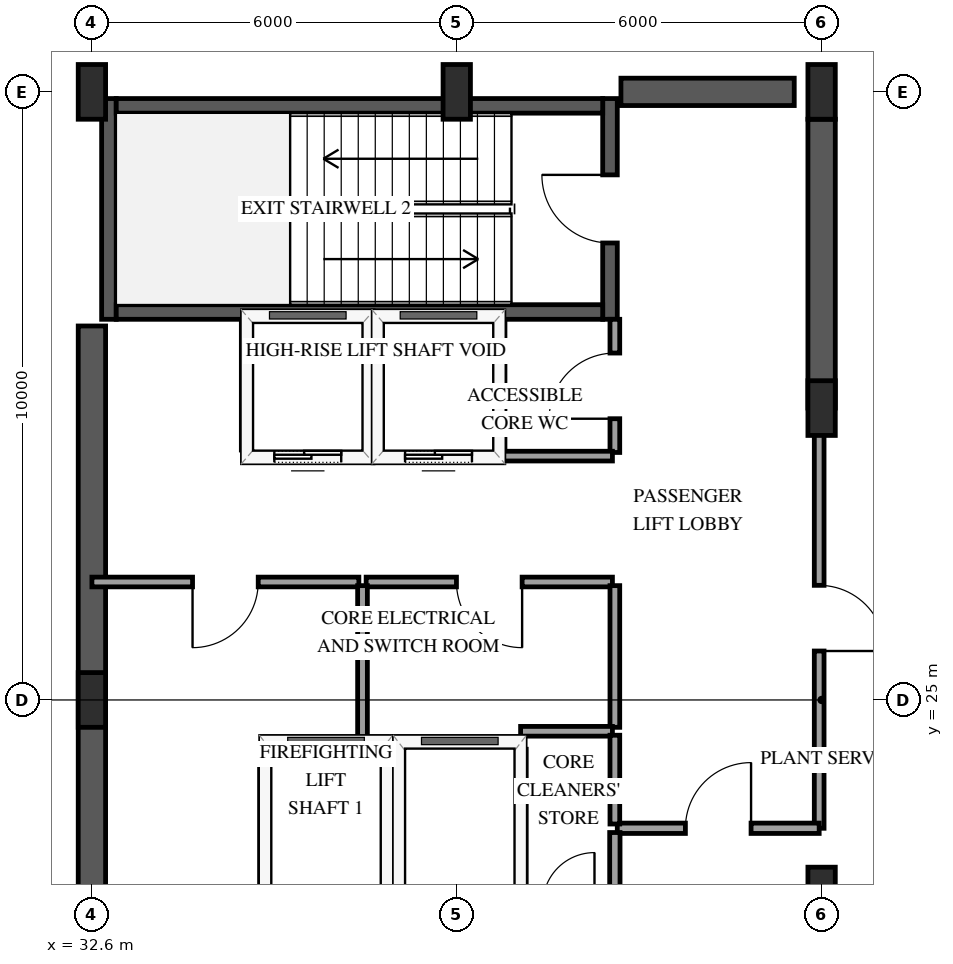
"""IFC4 building model, lengths in metres.
Left out: names, types, materials, properties, quantities, classifications, styles, units other than length and angle.
Written with IfcOpenShell. Run it as: python <this file> out.ifc"""

import sys

from ifc_helpers import new_model, si_unit, direction, frame, frame_2d, origin, origin_2d, place, context, subcontext, project, spatial, rectangle, extrude, element, fill, save


model = new_model("IFC4")
c1 = context("Model", 3, precision=1e-05, world=origin(), true_north=direction((0.0, 1.0)))
c2 = subcontext(c1, "Body", "Model", "MODEL_VIEW")
j1 = project(units=[si_unit("LENGTHUNIT", "METRE"), si_unit("PLANEANGLEUNIT", "RADIAN")], contexts=[c1])
p1 = place(None, origin())
s1 = spatial("IfcSite", under=j1, at=p1, CompositionType="ELEMENT")
p2 = place(p1, origin())
s2 = spatial("IfcBuilding", under=s1, at=p2, CompositionType="ELEMENT")
p3 = place(p2, frame((0.0, 0.0, 283.75)))
s3 = spatial("IfcBuildingStorey", under=s2, at=p3, CompositionType="ELEMENT", Elevation=283.75)
p4 = place(p3, frame((32.88, 31.26, 0.0), z_axis=(0.0, 0.0, 1.0), x_axis=(0.0, 1.0, 0.0)))
e1 = element("IfcWall", 1, at=p4, inside=s3, PredefinedType="SHEAR", context=c2, shape_type="SweptSolid", body=[
    extrude(rectangle(XDim=3.63, YDim=0.24, at=frame_2d((1.815, 0.0))), origin(), (0.0, 0.0, 1.0), 4.8),
])
p5 = place(p3, frame((41.12, 31.26, 0.0), z_axis=(0.0, 0.0, 1.0), x_axis=(0.0, 1.0, 0.0)))
e2 = element("IfcWall", 2, at=p5, inside=s3, PredefinedType="SHEAR", context=c2, shape_type="SweptSolid", body=[
    extrude(rectangle(XDim=3.63, YDim=0.24, at=frame_2d((1.815, 0.0))), origin(), (0.0, 0.0, 1.0), 4.8),
])
p6 = place(p5, frame((1.255, 0.0, 0.0)))
e3 = element("IfcOpeningElement", 3, at=p6, cuts=e2, PredefinedType="OPENING", context=c2, shape_type="SweptSolid", body=[
    extrude(rectangle(XDim=1.12, YDim=2.15, at=frame_2d((0.56, 1.075))), frame((0.0, 0.13, 0.0), z_axis=(0.0, -1.0, 0.0), x_axis=(1.0, 0.0, 0.0)), (0.0, 0.0, 1.0), 0.26),
])
for number, where, z_axis, x_axis in (
    (4, (33.0, 31.38, 0.0), (0.0, 0.0, 1.0), (1.0, 0.0, 0.0)),
    (5, (33.0, 34.77, 0.0), (0.0, 0.0, 1.0), (1.0, 0.0, 0.0)),
):
    element("IfcWall", number, at=place(p3, frame(where, z_axis=z_axis, x_axis=x_axis)), inside=s3, PredefinedType="SHEAR", context=c2, shape_type="SweptSolid", body=[
        extrude(rectangle(XDim=8.0, YDim=0.24, at=frame_2d((4.0, 0.0))), origin(), (0.0, 0.0, 1.0), 4.8),
    ])
p7 = place(p3, frame((32.6, 18.85, 0.0), z_axis=(0.0, 0.0, 1.0), x_axis=(0.0, 1.0, 0.0)))
e6 = element("IfcWall", 6, at=p7, inside=s3, PredefinedType="SHEAR", context=c2, shape_type="SweptSolid", body=[
    extrude(rectangle(XDim=12.3, YDim=0.45, at=frame_2d((6.15, 0.0))), origin(), (0.0, 0.0, 1.0), 4.8),
])
p8 = place(p3, frame((41.3, 35.0, 0.0), z_axis=(0.0, 0.0, 1.0), x_axis=(1.0, 0.0, 0.0)))
e7 = element("IfcWall", 7, at=p8, inside=s3, PredefinedType="SHEAR", context=c2, shape_type="SweptSolid", body=[
    extrude(rectangle(XDim=2.85, YDim=0.45, at=frame_2d((1.425, 0.0))), origin(), (0.0, 0.0, 1.0), 4.8),
])
p9 = place(p3, frame((44.6, 29.8, 0.0), z_axis=(0.0, 0.0, 1.0), x_axis=(0.0, 1.0, 0.0)))
e8 = element("IfcWall", 8, at=p9, inside=s3, PredefinedType="SHEAR", context=c2, shape_type="SweptSolid", body=[
    extrude(rectangle(XDim=4.75, YDim=0.45, at=frame_2d((2.375, 0.0))), origin(), (0.0, 0.0, 1.0), 4.8),
])
for number, where, z_axis, x_axis in (
    (9, (32.6, 25.0, 0.0), (0.0, 0.0, 1.0), (1.0, 0.0, 0.0)),
    (10, (32.6, 35.0, 0.0), (0.0, 0.0, 1.0), (1.0, 0.0, 0.0)),
    (11, (38.6, 35.0, 0.0), (0.0, 0.0, 1.0), (1.0, 0.0, 0.0)),
    (12, (44.6, 21.8, 0.0), (0.0, 0.0, 1.0), (1.0, 0.0, 0.0)),
    (13, (44.6, 29.8, 0.0), (0.0, 0.0, 1.0), (1.0, 0.0, 0.0)),
    (14, (44.6, 35.0, 0.0), (0.0, 0.0, 1.0), (1.0, 0.0, 0.0)),
):
    element("IfcColumn", number, at=place(p3, frame(where, z_axis=z_axis, x_axis=x_axis)), inside=s3, PredefinedType="PILASTER", context=c2, shape_type="SweptSolid", body=[
        extrude(rectangle(XDim=0.45, YDim=0.9, at=origin_2d()), origin(), (0.0, 0.0, 1.0), 4.8),
    ])
p10 = place(p3, frame((35.45, 24.3, 0.0), z_axis=(0.0, 0.0, 1.0), x_axis=(1.0, 0.0, 0.0)))
e15 = element("IfcWall", 15, at=p10, inside=s3, PredefinedType="SOLIDWALL", context=c2, shape_type="SweptSolid", body=[
    extrude(rectangle(XDim=2.0, YDim=0.185, at=frame_2d((1.0, 0.0))), origin(), (0.0, 0.0, 1.0), 4.5),
])
for number, where, z_axis, x_axis in (
    (16, (35.45, 21.81, 0.0), (0.0, 0.0, 1.0), (0.0, 1.0, 0.0)),
    (17, (37.45, 21.81, 0.0), (0.0, 0.0, 1.0), (0.0, 1.0, 0.0)),
):
    element("IfcWall", number, at=place(p3, frame(where, z_axis=z_axis, x_axis=x_axis)), inside=s3, PredefinedType="SOLIDWALL", context=c2, shape_type="SweptSolid", body=[
        extrude(rectangle(XDim=2.38, YDim=0.185, at=frame_2d((1.19, 0.0))), origin(), (0.0, 0.0, 1.0), 4.5),
    ])
p11 = place(p3, frame((37.65, 24.3, 0.0), z_axis=(0.0, 0.0, 1.0), x_axis=(1.0, 0.0, 0.0)))
e18 = element("IfcWall", 18, at=p11, inside=s3, PredefinedType="SOLIDWALL", context=c2, shape_type="SweptSolid", body=[
    extrude(rectangle(XDim=2.0, YDim=0.185, at=frame_2d((1.0, 0.0))), origin(), (0.0, 0.0, 1.0), 4.5),
])
p12 = place(p3, frame((39.65, 21.81, 0.0), z_axis=(0.0, 0.0, 1.0), x_axis=(0.0, 1.0, 0.0)))
e19 = element("IfcWall", 19, at=p12, inside=s3, PredefinedType="SOLIDWALL", context=c2, shape_type="SweptSolid", body=[
    extrude(rectangle(XDim=2.38, YDim=0.185, at=frame_2d((1.19, 0.0))), origin(), (0.0, 0.0, 1.0), 4.5),
])
p13 = place(p3, frame((35.15, 29.0, 0.0), z_axis=(0.0, 0.0, 1.0), x_axis=(1.0, 0.0, 0.0)))
e20 = element("IfcWall", 20, at=p13, inside=s3, PredefinedType="SOLIDWALL", context=c2, shape_type="SweptSolid", body=[
    extrude(rectangle(XDim=2.0, YDim=0.185, at=frame_2d((1.0, 0.0))), origin(), (0.0, 0.0, 1.0), 4.5),
])
p14 = place(p13, frame((0.45, 0.0, 0.0)))
e21 = element("IfcOpeningElement", 21, at=p14, cuts=e20, PredefinedType="OPENING", context=c2, shape_type="SweptSolid", body=[
    extrude(rectangle(XDim=1.1, YDim=2.15, at=frame_2d((0.55, 1.075))), frame((0.0, 0.103, 0.0), z_axis=(0.0, -1.0, 0.0), x_axis=(1.0, 0.0, 0.0)), (0.0, 0.0, 1.0), 0.205),
])
for number, where, z_axis, x_axis in (
    (22, (35.15, 29.11, 0.0), (0.0, 0.0, 1.0), (0.0, 1.0, 0.0)),
    (23, (37.15, 29.11, 0.0), (0.0, 0.0, 1.0), (0.0, 1.0, 0.0)),
):
    element("IfcWall", number, at=place(p3, frame(where, z_axis=z_axis, x_axis=x_axis)), inside=s3, PredefinedType="SOLIDWALL", context=c2, shape_type="SweptSolid", body=[
        extrude(rectangle(XDim=2.1, YDim=0.185, at=frame_2d((1.05, 0.0))), origin(), (0.0, 0.0, 1.0), 4.5),
    ])
p15 = place(p3, frame((37.3, 29.0, 0.0), z_axis=(0.0, 0.0, 1.0), x_axis=(1.0, 0.0, 0.0)))
e24 = element("IfcWall", 24, at=p15, inside=s3, PredefinedType="SOLIDWALL", context=c2, shape_type="SweptSolid", body=[
    extrude(rectangle(XDim=2.0, YDim=0.185, at=frame_2d((1.0, 0.0))), origin(), (0.0, 0.0, 1.0), 4.5),
])
p16 = place(p15, frame((0.45, 0.0, 0.0)))
e25 = element("IfcOpeningElement", 25, at=p16, cuts=e24, PredefinedType="OPENING", context=c2, shape_type="SweptSolid", body=[
    extrude(rectangle(XDim=1.1, YDim=2.15, at=frame_2d((0.55, 1.075))), frame((0.0, 0.103, 0.0), z_axis=(0.0, -1.0, 0.0), x_axis=(1.0, 0.0, 0.0)), (0.0, 0.0, 1.0), 0.205),
])
p17 = place(p3, frame((39.3, 29.11, 0.0), z_axis=(0.0, 0.0, 1.0), x_axis=(0.0, 1.0, 0.0)))
e26 = element("IfcWall", 26, at=p17, inside=s3, PredefinedType="SOLIDWALL", context=c2, shape_type="SweptSolid", body=[
    extrude(rectangle(XDim=2.1, YDim=0.185, at=frame_2d((1.05, 0.0))), origin(), (0.0, 0.0, 1.0), 4.5),
])
p18 = place(p3, frame((44.56, 29.8, 0.0), z_axis=(0.0, 0.0, 1.0), x_axis=(0.0, -1.0, 0.0)))
e27 = element("IfcWall", 27, at=p18, inside=s3, PredefinedType="PARTITIONING", context=c2, shape_type="SweptSolid", body=[
    extrude(rectangle(XDim=6.91, YDim=0.16, at=frame_2d((3.455, 0.0))), origin(), (0.0, 0.0, 1.0), 3.54),
])
p19 = place(p18, frame((2.915, 0.0, 0.0)))
e28 = element("IfcOpeningElement", 28, at=p19, cuts=e27, PredefinedType="OPENING", context=c2, shape_type="SweptSolid", body=[
    extrude(rectangle(XDim=1.08, YDim=2.15, at=frame_2d((0.54, 1.075))), frame((0.0, 0.09, 0.0), z_axis=(0.0, -1.0, 0.0), x_axis=(1.0, 0.0, 0.0)), (0.0, 0.0, 1.0), 0.18),
])
p20 = place(p3, frame((36.99, 26.94, 0.0), z_axis=(0.0, 0.0, 1.0), x_axis=(-1.0, 0.0, 0.0)))
e29 = element("IfcWall", 29, at=p20, inside=s3, PredefinedType="PARTITIONING", context=c2, shape_type="SweptSolid", body=[
    extrude(rectangle(XDim=4.39, YDim=0.16, at=frame_2d((2.195, 0.0))), origin(), (0.0, 0.0, 1.0), 4.5),
])
p21 = place(p20, frame((1.655, 0.0, 0.0)))
e30 = element("IfcOpeningElement", 30, at=p21, cuts=e29, PredefinedType="OPENING", context=c2, shape_type="SweptSolid", body=[
    extrude(rectangle(XDim=1.08, YDim=2.15, at=frame_2d((0.54, 1.075))), frame((0.0, 0.09, 0.0), z_axis=(0.0, -1.0, 0.0), x_axis=(1.0, 0.0, 0.0)), (0.0, 0.0, 1.0), 0.18),
])
p22 = place(p3, frame((41.16, 26.94, 0.0), z_axis=(0.0, 0.0, 1.0), x_axis=(-1.0, 0.0, 0.0)))
e31 = element("IfcWall", 31, at=p22, inside=s3, PredefinedType="PARTITIONING", context=c2, shape_type="SweptSolid", body=[
    extrude(rectangle(XDim=4.05, YDim=0.16, at=frame_2d((2.025, 0.0))), origin(), (0.0, 0.0, 1.0), 4.5),
])
p23 = place(p22, frame((1.485, 0.0, 0.0)))
e32 = element("IfcOpeningElement", 32, at=p23, cuts=e31, PredefinedType="OPENING", context=c2, shape_type="SweptSolid", body=[
    extrude(rectangle(XDim=1.08, YDim=2.15, at=frame_2d((0.54, 1.075))), frame((0.0, 0.09, 0.0), z_axis=(0.0, -1.0, 0.0), x_axis=(1.0, 0.0, 0.0)), (0.0, 0.0, 1.0), 0.18),
])
p24 = place(p3, frame((41.24, 22.89, 0.0), z_axis=(0.0, 0.0, 1.0), x_axis=(1.0, 0.0, 0.0)))
e33 = element("IfcWall", 33, at=p24, inside=s3, PredefinedType="PARTITIONING", context=c2, shape_type="SweptSolid", body=[
    extrude(rectangle(XDim=3.32, YDim=0.17, at=frame_2d((1.66, 0.0))), origin(), (0.0, 0.0, 1.0), 4.5),
])
p25 = place(p24, frame((1.12, 0.0, 0.0)))
e34 = element("IfcOpeningElement", 34, at=p25, cuts=e33, PredefinedType="OPENING", context=c2, shape_type="SweptSolid", body=[
    extrude(rectangle(XDim=1.08, YDim=2.15, at=frame_2d((0.54, 1.075))), frame((0.0, 0.095, 0.0), z_axis=(0.0, -1.0, 0.0), x_axis=(1.0, 0.0, 0.0)), (0.0, 0.0, 1.0), 0.19),
])
p26 = place(p3, frame((37.05, 26.88, 0.0), z_axis=(0.0, 0.0, 1.0), x_axis=(0.0, -1.0, 0.0)))
e35 = element("IfcWall", 35, at=p26, inside=s3, PredefinedType="PARTITIONING", context=c2, shape_type="SweptSolid", body=[
    extrude(rectangle(XDim=2.58, YDim=0.16, at=frame_2d((1.29, 0.0))), origin(), (0.0, 0.0, 1.0), 4.5),
])
p27 = place(p3, frame((41.2, 24.55, 0.0), z_axis=(0.0, 0.0, 1.0), x_axis=(0.0, 1.0, 0.0)))
e36 = element("IfcWall", 36, at=p27, inside=s3, PredefinedType="PARTITIONING", context=c2, shape_type="SweptSolid", body=[
    extrude(rectangle(XDim=2.33, YDim=0.16, at=frame_2d((1.165, 0.0))), origin(), (0.0, 0.0, 1.0), 4.5),
])
p28 = place(p3, frame((41.2, 29.07, 0.0), z_axis=(0.0, 0.0, 1.0), x_axis=(0.0, 1.0, 0.0)))
e37 = element("IfcWall", 37, at=p28, inside=s3, PredefinedType="PARTITIONING", context=c2, shape_type="SweptSolid", body=[
    extrude(rectangle(XDim=2.19, YDim=0.16, at=frame_2d((1.095, 0.0))), origin(), (0.0, 0.0, 1.0), 4.5),
])
p29 = place(p28, frame((0.555, 0.0, 0.0)))
e38 = element("IfcOpeningElement", 38, at=p29, cuts=e37, PredefinedType="OPENING", context=c2, shape_type="SweptSolid", body=[
    extrude(rectangle(XDim=1.08, YDim=2.15, at=frame_2d((0.54, 1.075))), frame((0.0, 0.09, 0.0), z_axis=(0.0, -1.0, 0.0), x_axis=(1.0, 0.0, 0.0)), (0.0, 0.0, 1.0), 0.18),
])
p30 = place(p3, frame((39.3, 29.01, 0.0), z_axis=(0.0, 0.0, 1.0), x_axis=(1.0, 0.0, 0.0)))
e39 = element("IfcWall", 39, at=p30, inside=s3, PredefinedType="PARTITIONING", context=c2, shape_type="SweptSolid", body=[
    extrude(rectangle(XDim=1.86, YDim=0.16, at=frame_2d((0.93, 0.0))), origin(), (0.0, 0.0, 1.0), 4.5),
])
p31 = place(p3, frame((39.65, 24.485, 0.0), z_axis=(0.0, 0.0, 1.0), x_axis=(1.0, 0.0, 0.0)))
e40 = element("IfcWall", 40, at=p31, inside=s3, PredefinedType="PARTITIONING", context=c2, shape_type="SweptSolid", body=[
    extrude(rectangle(XDim=1.51, YDim=0.16, at=frame_2d((0.755, 0.0))), origin(), (0.0, 0.0, 1.0), 4.5),
])
p32 = place(p3, frame((41.2, 22.96, 0.0), z_axis=(0.0, 0.0, 1.0), x_axis=(0.0, 1.0, 0.0)))
e41 = element("IfcWall", 41, at=p32, inside=s3, PredefinedType="PARTITIONING", context=c2, shape_type="SweptSolid", body=[
    extrude(rectangle(XDim=1.46, YDim=0.16, at=frame_2d((0.73, 0.0))), origin(), (0.0, 0.0, 1.0), 4.5),
])
p33 = place(p3, frame((41.2, 21.7, 0.0), z_axis=(0.0, 0.0, 1.0), x_axis=(0.0, 1.0, 0.0)))
e42 = element("IfcWall", 42, at=p33, inside=s3, PredefinedType="PARTITIONING", context=c2, shape_type="SweptSolid", body=[
    extrude(rectangle(XDim=1.12, YDim=0.17, at=frame_2d((0.56, 0.0))), origin(), (0.0, 0.0, 1.0), 4.5),
])
p34 = place(p14, origin())
e43 = element("IfcDoor", 43, at=p34, inside=s3, OperationType="SLIDING_TO_LEFT", PredefinedType="DOOR", context=c2, shape_type="SweptSolid", body=[
    extrude(rectangle(XDim=1.1, YDim=2.15, at=frame_2d((0.55, 1.075))), frame((0.0, 0.025, 0.0), z_axis=(0.0, -1.0, 0.0), x_axis=(1.0, 0.0, 0.0)), (0.0, 0.0, 1.0), 0.05),
])
fill(e21, e43)
p35 = place(p16, origin())
e44 = element("IfcDoor", 44, at=p35, inside=s3, OperationType="SLIDING_TO_LEFT", PredefinedType="DOOR", context=c2, shape_type="SweptSolid", body=[
    extrude(rectangle(XDim=1.1, YDim=2.15, at=frame_2d((0.55, 1.075))), frame((0.0, 0.025, 0.0), z_axis=(0.0, -1.0, 0.0), x_axis=(1.0, 0.0, 0.0)), (0.0, 0.0, 1.0), 0.05),
])
fill(e25, e44)
p36 = place(p6, origin())
e45 = element("IfcDoor", 45, at=p36, inside=s3, OperationType="SINGLE_SWING_RIGHT", PredefinedType="DOOR", context=c2, shape_type="SweptSolid", body=[
    extrude(rectangle(XDim=1.12, YDim=2.15, at=frame_2d((0.56, 1.075))), frame((0.0, 0.025, 0.0), z_axis=(0.0, -1.0, 0.0), x_axis=(1.0, 0.0, 0.0)), (0.0, 0.0, 1.0), 0.05),
])
fill(e3, e45)
p37 = place(p19, origin())
e46 = element("IfcDoor", 46, at=p37, inside=s3, OperationType="SINGLE_SWING_RIGHT", PredefinedType="DOOR", context=c2, shape_type="SweptSolid", body=[
    extrude(rectangle(XDim=1.08, YDim=2.15, at=frame_2d((0.54, 1.075))), frame((0.0, 0.025, 0.0), z_axis=(0.0, -1.0, 0.0), x_axis=(1.0, 0.0, 0.0)), (0.0, 0.0, 1.0), 0.05),
])
fill(e28, e46)
p38 = place(p21, origin())
e47 = element("IfcDoor", 47, at=p38, inside=s3, OperationType="SINGLE_SWING_RIGHT", PredefinedType="DOOR", context=c2, shape_type="SweptSolid", body=[
    extrude(rectangle(XDim=1.08, YDim=2.15, at=frame_2d((0.54, 1.075))), frame((0.0, 0.025, 0.0), z_axis=(0.0, -1.0, 0.0), x_axis=(1.0, 0.0, 0.0)), (0.0, 0.0, 1.0), 0.05),
])
fill(e30, e47)
p39 = place(p23, origin())
e48 = element("IfcDoor", 48, at=p39, inside=s3, OperationType="SINGLE_SWING_LEFT", PredefinedType="DOOR", context=c2, shape_type="SweptSolid", body=[
    extrude(rectangle(XDim=1.08, YDim=2.15, at=frame_2d((0.54, 1.075))), frame((0.0, 0.025, 0.0), z_axis=(0.0, -1.0, 0.0), x_axis=(1.0, 0.0, 0.0)), (0.0, 0.0, 1.0), 0.05),
])
fill(e32, e48)
p40 = place(p25, origin())
e49 = element("IfcDoor", 49, at=p40, inside=s3, OperationType="SINGLE_SWING_RIGHT", PredefinedType="DOOR", context=c2, shape_type="SweptSolid", body=[
    extrude(rectangle(XDim=1.08, YDim=2.15, at=frame_2d((0.54, 1.075))), frame((0.0, 0.025, 0.0), z_axis=(0.0, -1.0, 0.0), x_axis=(1.0, 0.0, 0.0)), (0.0, 0.0, 1.0), 0.05),
])
fill(e34, e49)
p41 = place(p29, origin())
e50 = element("IfcDoor", 50, at=p41, inside=s3, OperationType="SINGLE_SWING_LEFT", PredefinedType="DOOR", context=c2, shape_type="SweptSolid", body=[
    extrude(rectangle(XDim=1.08, YDim=2.15, at=frame_2d((0.54, 1.075))), frame((0.0, 0.025, 0.0), z_axis=(0.0, -1.0, 0.0), x_axis=(1.0, 0.0, 0.0)), (0.0, 0.0, 1.0), 0.05),
])
fill(e38, e50)
save(model, sys.argv[1])
